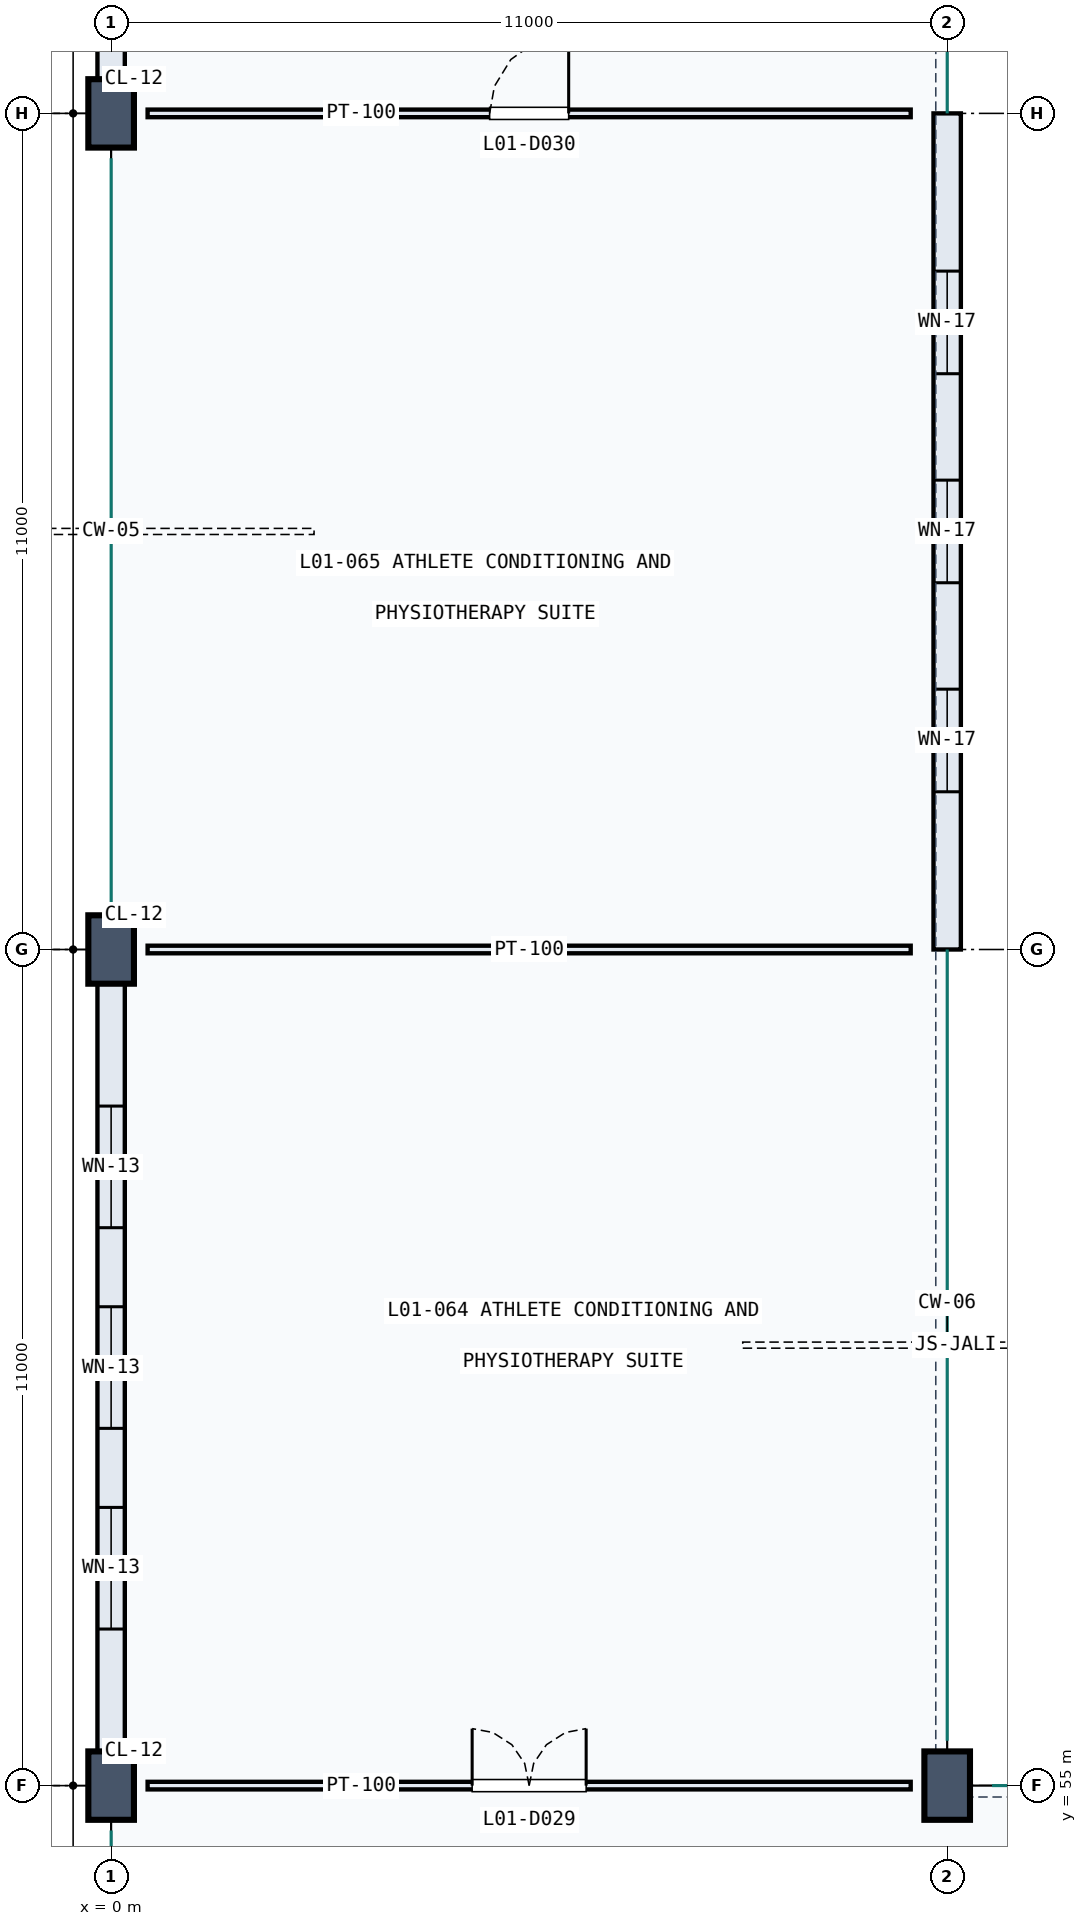
"""IFC4 building model, lengths in metres.
Left out: names, types, materials, properties, quantities, classifications, styles, units other than length and angle.
Written with IfcOpenShell. Run it as: python <this file> out.ifc"""

import sys

from ifc_helpers import new_model, si_unit, direction, frame, frame_2d, origin, origin_2d, place, context, subcontext, project, spatial, rectangle, extrude, element, fill, save


model = new_model("IFC4")
c1 = context("Model", 3, precision=1e-05, world=origin(), true_north=direction((0.0, 1.0)))
c2 = subcontext(c1, "Body", "Model", "MODEL_VIEW")
j1 = project(units=[si_unit("LENGTHUNIT", "METRE"), si_unit("PLANEANGLEUNIT", "RADIAN")], contexts=[c1])
p1 = place(None, origin())
s1 = spatial("IfcSite", under=j1, at=p1, CompositionType="ELEMENT")
p2 = place(p1, origin())
s2 = spatial("IfcBuilding", under=s1, at=p2, CompositionType="ELEMENT")
p3 = place(p2, frame((0.0, 0.0, 5.4)))
s3 = spatial("IfcBuildingStorey", under=s2, at=p3, CompositionType="ELEMENT", Elevation=5.4)
for number, where, z_axis, x_axis in (
    (1, (0.0, 55.0, 0.0), (0.0, 0.0, 1.0), (1.0, 0.0, 0.0)),
    (2, (0.0, 66.0, 0.0), (0.0, 0.0, 1.0), (1.0, 0.0, 0.0)),
    (3, (0.0, 77.0, 0.0), (0.0, 0.0, 1.0), (1.0, 0.0, 0.0)),
    (4, (11.0, 55.0, 0.0), (0.0, 0.0, 1.0), (1.0, 0.0, 0.0)),
):
    element("IfcColumn", number, at=place(p3, frame(where, z_axis=z_axis, x_axis=x_axis)), inside=s3, PredefinedType="COLUMN", context=c2, shape_type="SweptSolid", body=[
        extrude(rectangle(XDim=0.6, YDim=0.9, at=origin_2d()), origin(), (0.0, 0.0, 1.0), 4.8),
    ])
p4 = place(p3, frame((0.0, 55.22, 0.0), z_axis=(0.0, 0.0, 1.0), x_axis=(0.0, 1.0, 0.0)))
e5 = element("IfcWall", 5, at=p4, inside=s3, PredefinedType="SOLIDWALL", context=c2, shape_type="SweptSolid", body=[
    extrude(rectangle(XDim=10.56, YDim=0.36, at=frame_2d((5.28, 0.0))), origin(), (0.0, 0.0, 1.0), 3.49),
])
p5 = place(p4, frame((1.84, 0.0, 0.9)))
e6 = element("IfcOpeningElement", 6, at=p5, cuts=e5, PredefinedType="OPENING", context=c2, shape_type="SweptSolid", body=[
    extrude(rectangle(XDim=1.6, YDim=1.65, at=frame_2d((0.8, 0.825))), frame((0.0, 0.19, 0.0), z_axis=(0.0, -1.0, 0.0), x_axis=(1.0, 0.0, 0.0)), (0.0, 0.0, 1.0), 0.38),
])
p6 = place(p4, frame((4.48, 0.0, 0.9)))
e7 = element("IfcOpeningElement", 7, at=p6, cuts=e5, PredefinedType="OPENING", context=c2, shape_type="SweptSolid", body=[
    extrude(rectangle(XDim=1.6, YDim=1.65, at=frame_2d((0.8, 0.825))), frame((0.0, 0.19, 0.0), z_axis=(0.0, -1.0, 0.0), x_axis=(1.0, 0.0, 0.0)), (0.0, 0.0, 1.0), 0.38),
])
p7 = place(p4, frame((7.12, 0.0, 0.9)))
e8 = element("IfcOpeningElement", 8, at=p7, cuts=e5, PredefinedType="OPENING", context=c2, shape_type="SweptSolid", body=[
    extrude(rectangle(XDim=1.6, YDim=1.65, at=frame_2d((0.8, 0.825))), frame((0.0, 0.19, 0.0), z_axis=(0.0, -1.0, 0.0), x_axis=(1.0, 0.0, 0.0)), (0.0, 0.0, 1.0), 0.38),
])
p8 = place(p3, frame((11.0, 66.0, 0.0), z_axis=(0.0, 0.0, 1.0), x_axis=(0.0, 1.0, 0.0)))
e9 = element("IfcWall", 9, at=p8, inside=s3, PredefinedType="SOLIDWALL", context=c2, shape_type="SweptSolid", body=[
    extrude(rectangle(XDim=11.0, YDim=0.36, at=frame_2d((5.5, 0.0))), origin(), (0.0, 0.0, 1.0), 4.465),
])
p9 = place(p8, frame((2.075, 0.0, 0.8)))
e10 = element("IfcOpeningElement", 10, at=p9, cuts=e9, PredefinedType="OPENING", context=c2, shape_type="SweptSolid", body=[
    extrude(rectangle(XDim=1.35, YDim=2.1, at=frame_2d((0.675, 1.05))), frame((0.0, 0.19, 0.0), z_axis=(0.0, -1.0, 0.0), x_axis=(1.0, 0.0, 0.0)), (0.0, 0.0, 1.0), 0.38),
])
p10 = place(p8, frame((4.825, 0.0, 0.8)))
e11 = element("IfcOpeningElement", 11, at=p10, cuts=e9, PredefinedType="OPENING", context=c2, shape_type="SweptSolid", body=[
    extrude(rectangle(XDim=1.35, YDim=2.1, at=frame_2d((0.675, 1.05))), frame((0.0, 0.19, 0.0), z_axis=(0.0, -1.0, 0.0), x_axis=(1.0, 0.0, 0.0)), (0.0, 0.0, 1.0), 0.38),
])
p11 = place(p8, frame((7.575, 0.0, 0.8)))
e12 = element("IfcOpeningElement", 12, at=p11, cuts=e9, PredefinedType="OPENING", context=c2, shape_type="SweptSolid", body=[
    extrude(rectangle(XDim=1.35, YDim=2.1, at=frame_2d((0.675, 1.05))), frame((0.0, 0.19, 0.0), z_axis=(0.0, -1.0, 0.0), x_axis=(1.0, 0.0, 0.0)), (0.0, 0.0, 1.0), 0.38),
])
p12 = place(p3, frame((0.0, 77.22, 0.0), z_axis=(0.0, 0.0, 1.0), x_axis=(0.0, 1.0, 0.0)))
e13 = element("IfcWall", 13, at=p12, inside=s3, PredefinedType="SOLIDWALL", context=c2, shape_type="SweptSolid", body=[
    extrude(rectangle(XDim=10.56, YDim=0.36, at=frame_2d((5.28, 0.0))), origin(), (0.0, 0.0, 1.0), 3.707),
])
p13 = place(p12, frame((4.03, 0.0, 1.0)))
e14 = element("IfcOpeningElement", 14, at=p13, cuts=e13, PredefinedType="OPENING", context=c2, shape_type="SweptSolid", body=[
    extrude(rectangle(XDim=2.5, YDim=1.35, at=frame_2d((1.25, 0.675))), frame((0.0, 0.19, 0.0), z_axis=(0.0, -1.0, 0.0), x_axis=(1.0, 0.0, 0.0)), (0.0, 0.0, 1.0), 0.38),
])
p14 = place(p3, frame((0.48, 55.0, 0.0), z_axis=(0.0, 0.0, 1.0), x_axis=(1.0, 0.0, 0.0)))
e15 = element("IfcWall", 15, at=p14, inside=s3, PredefinedType="PARTITIONING", context=c2, shape_type="SweptSolid", body=[
    extrude(rectangle(XDim=10.04, YDim=0.1, at=frame_2d((5.02, 0.0))), origin(), (0.0, 0.0, 1.0), 3.49),
])
p15 = place(p14, frame((4.27, 0.0, 0.0)))
e16 = element("IfcOpeningElement", 16, at=p15, cuts=e15, PredefinedType="OPENING", context=c2, shape_type="SweptSolid", body=[
    extrude(rectangle(XDim=1.5, YDim=2.3, at=frame_2d((0.75, 1.15))), frame((0.0, 0.06, 0.0), z_axis=(0.0, -1.0, 0.0), x_axis=(1.0, 0.0, 0.0)), (0.0, 0.0, 1.0), 0.12),
])
p16 = place(p3, frame((0.48, 77.0, 0.0), z_axis=(0.0, 0.0, 1.0), x_axis=(1.0, 0.0, 0.0)))
e17 = element("IfcWall", 17, at=p16, inside=s3, PredefinedType="PARTITIONING", context=c2, shape_type="SweptSolid", body=[
    extrude(rectangle(XDim=10.04, YDim=0.1, at=frame_2d((5.02, 0.0))), origin(), (0.0, 0.0, 1.0), 3.79),
])
p17 = place(p16, frame((4.5, 0.0, 0.0)))
e18 = element("IfcOpeningElement", 18, at=p17, cuts=e17, PredefinedType="OPENING", context=c2, shape_type="SweptSolid", body=[
    extrude(rectangle(XDim=1.04, YDim=2.15, at=frame_2d((0.52, 1.075))), frame((0.0, 0.06, 0.0), z_axis=(0.0, -1.0, 0.0), x_axis=(1.0, 0.0, 0.0)), (0.0, 0.0, 1.0), 0.12),
])
p18 = place(p3, frame((0.48, 66.0, 0.0), z_axis=(0.0, 0.0, 1.0), x_axis=(1.0, 0.0, 0.0)))
e19 = element("IfcWall", 19, at=p18, inside=s3, PredefinedType="PARTITIONING", context=c2, shape_type="SweptSolid", body=[
    extrude(rectangle(XDim=10.04, YDim=0.1, at=frame_2d((5.02, 0.0))), origin(), (0.0, 0.0, 1.0), 3.79),
])
p19 = place(p5, origin())
e20 = element("IfcWindow", 20, at=p19, inside=s3, PartitioningType="SINGLE_PANEL", PredefinedType="WINDOW", context=c2, shape_type="SweptSolid", body=[
    extrude(rectangle(XDim=1.6, YDim=1.65, at=frame_2d((0.8, 0.825))), frame((0.0, 0.03, 0.0), z_axis=(0.0, -1.0, 0.0), x_axis=(1.0, 0.0, 0.0)), (0.0, 0.0, 1.0), 0.06),
])
fill(e6, e20)
p20 = place(p6, origin())
e21 = element("IfcWindow", 21, at=p20, inside=s3, PartitioningType="SINGLE_PANEL", PredefinedType="WINDOW", context=c2, shape_type="SweptSolid", body=[
    extrude(rectangle(XDim=1.6, YDim=1.65, at=frame_2d((0.8, 0.825))), frame((0.0, 0.03, 0.0), z_axis=(0.0, -1.0, 0.0), x_axis=(1.0, 0.0, 0.0)), (0.0, 0.0, 1.0), 0.06),
])
fill(e7, e21)
p21 = place(p7, origin())
e22 = element("IfcWindow", 22, at=p21, inside=s3, PartitioningType="SINGLE_PANEL", PredefinedType="WINDOW", context=c2, shape_type="SweptSolid", body=[
    extrude(rectangle(XDim=1.6, YDim=1.65, at=frame_2d((0.8, 0.825))), frame((0.0, 0.03, 0.0), z_axis=(0.0, -1.0, 0.0), x_axis=(1.0, 0.0, 0.0)), (0.0, 0.0, 1.0), 0.06),
])
fill(e8, e22)
p22 = place(p9, origin())
e23 = element("IfcWindow", 23, at=p22, inside=s3, PartitioningType="SINGLE_PANEL", PredefinedType="WINDOW", context=c2, shape_type="SweptSolid", body=[
    extrude(rectangle(XDim=1.35, YDim=2.1, at=frame_2d((0.675, 1.05))), frame((0.0, 0.03, 0.0), z_axis=(0.0, -1.0, 0.0), x_axis=(1.0, 0.0, 0.0)), (0.0, 0.0, 1.0), 0.06),
])
fill(e10, e23)
p23 = place(p10, origin())
e24 = element("IfcWindow", 24, at=p23, inside=s3, PartitioningType="SINGLE_PANEL", PredefinedType="WINDOW", context=c2, shape_type="SweptSolid", body=[
    extrude(rectangle(XDim=1.35, YDim=2.1, at=frame_2d((0.675, 1.05))), frame((0.0, 0.03, 0.0), z_axis=(0.0, -1.0, 0.0), x_axis=(1.0, 0.0, 0.0)), (0.0, 0.0, 1.0), 0.06),
])
fill(e11, e24)
p24 = place(p11, origin())
e25 = element("IfcWindow", 25, at=p24, inside=s3, PartitioningType="SINGLE_PANEL", PredefinedType="WINDOW", context=c2, shape_type="SweptSolid", body=[
    extrude(rectangle(XDim=1.35, YDim=2.1, at=frame_2d((0.675, 1.05))), frame((0.0, 0.03, 0.0), z_axis=(0.0, -1.0, 0.0), x_axis=(1.0, 0.0, 0.0)), (0.0, 0.0, 1.0), 0.06),
])
fill(e12, e25)
p25 = place(p15, origin())
e26 = element("IfcDoor", 26, at=p25, inside=s3, OperationType="DOUBLE_DOOR_SINGLE_SWING", PredefinedType="DOOR", context=c2, shape_type="SweptSolid", body=[
    extrude(rectangle(XDim=1.5, YDim=2.3, at=frame_2d((0.75, 1.15))), frame((0.0, 0.025, 0.0), z_axis=(0.0, -1.0, 0.0), x_axis=(1.0, 0.0, 0.0)), (0.0, 0.0, 1.0), 0.05),
])
fill(e16, e26)
p26 = place(p17, origin())
e27 = element("IfcDoor", 27, at=p26, inside=s3, OperationType="SINGLE_SWING_RIGHT", PredefinedType="DOOR", context=c2, shape_type="SweptSolid", body=[
    extrude(rectangle(XDim=1.04, YDim=2.15, at=frame_2d((0.52, 1.075))), frame((0.0, 0.025, 0.0), z_axis=(0.0, -1.0, 0.0), x_axis=(1.0, 0.0, 0.0)), (0.0, 0.0, 1.0), 0.05),
])
fill(e18, e27)
save(model, sys.argv[1])
